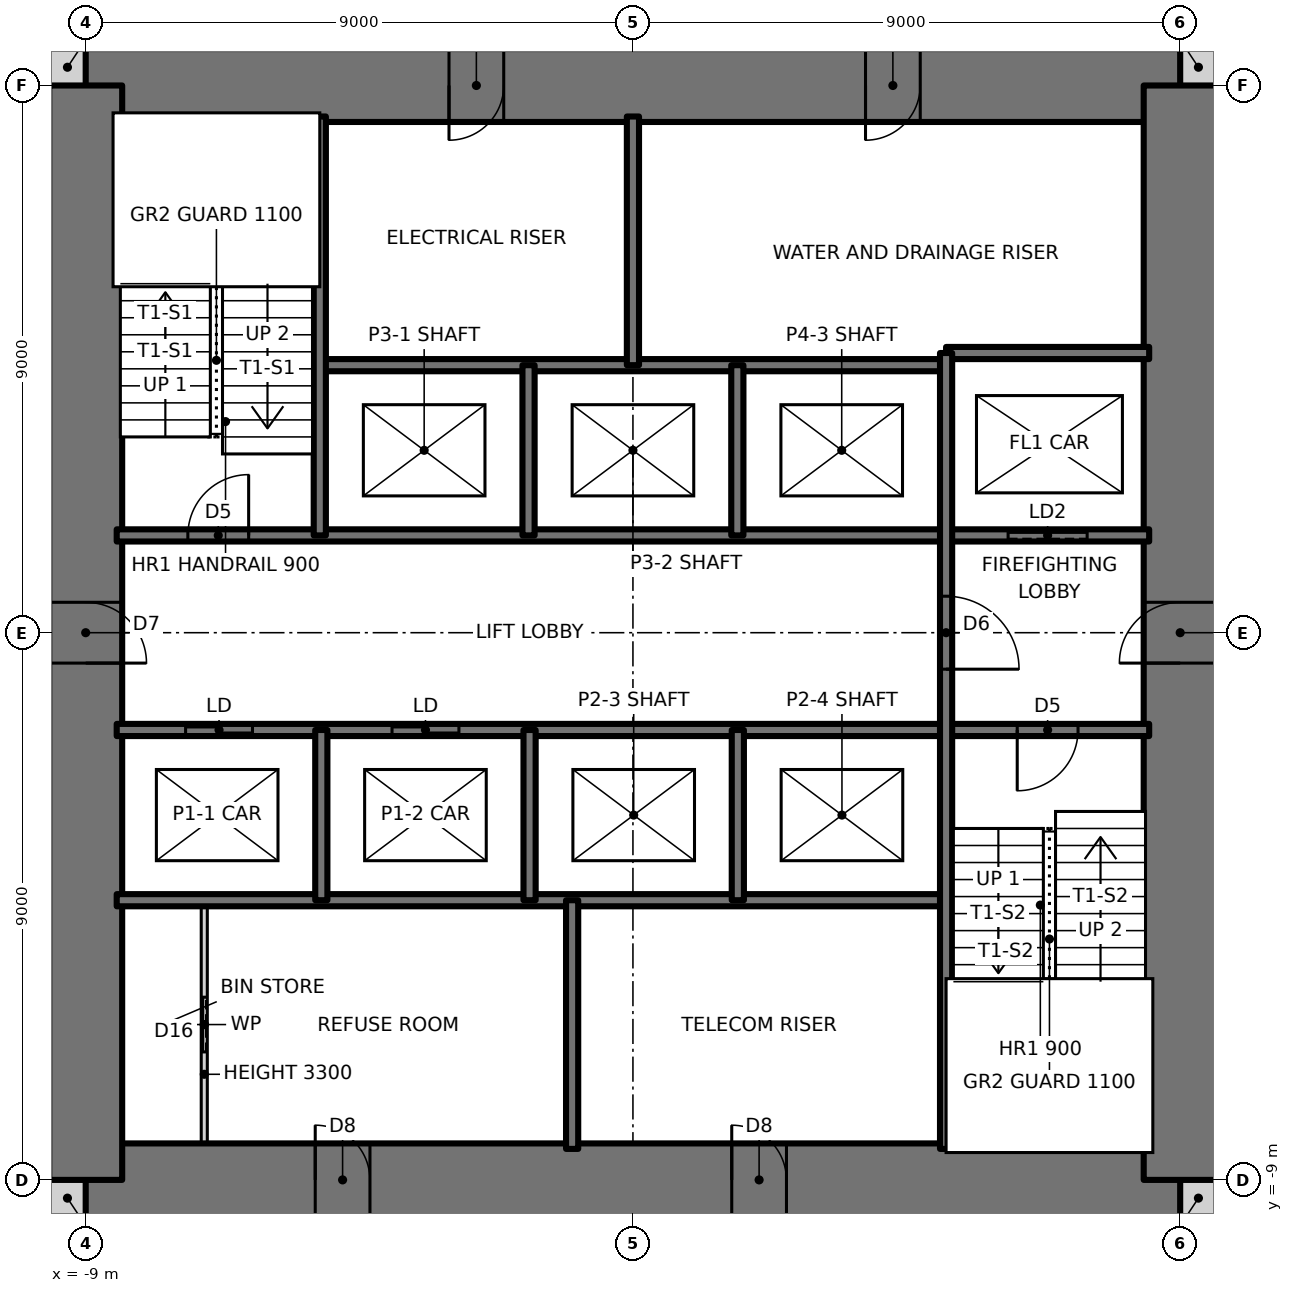
"""IFC4 building model, lengths in metres.
Left out: names, types, materials, properties, quantities, classifications, styles, units other than length and angle.
Written with IfcOpenShell. Run it as: python <this file> out.ifc"""

import sys

from ifc_helpers import new_model, si_unit, direction, frame, frame_2d, origin, place, context, subcontext, project, spatial, rectangle, extrude, element, fill, save


model = new_model("IFC4")
c1 = context("Model", 3, precision=1e-05, world=origin(), true_north=direction((0.0, 1.0)))
c2 = subcontext(c1, "Body", "Model", "MODEL_VIEW")
j1 = project(units=[si_unit("LENGTHUNIT", "METRE"), si_unit("PLANEANGLEUNIT", "RADIAN")], contexts=[c1])
p1 = place(None, origin())
s1 = spatial("IfcSite", under=j1, at=p1, CompositionType="ELEMENT")
p2 = place(p1, origin())
s2 = spatial("IfcBuilding", under=s1, at=p2, CompositionType="ELEMENT")
p3 = place(p2, frame((0.0, 0.0, 64.0)))
s3 = spatial("IfcBuildingStorey", under=s2, at=p3, CompositionType="ELEMENT", Elevation=64.0)
for number, where, z_axis, x_axis in (
    (1, (-9.6, -9.3, 0.0), (0.0, 0.0, 1.0), (1.0, 0.0, 0.0)),
    (2, (9.0, -9.3, 0.0), (0.0, 0.0, 1.0), (1.0, 0.0, 0.0)),
    (3, (9.0, 9.3, 0.0), (0.0, 0.0, 1.0), (1.0, 0.0, 0.0)),
    (4, (-9.6, 9.3, 0.0), (0.0, 0.0, 1.0), (1.0, 0.0, 0.0)),
):
    element("IfcWall", number, at=place(p3, frame(where, z_axis=z_axis, x_axis=x_axis)), inside=s3, PredefinedType="SOLIDWALL", context=c2, shape_type="SweptSolid", body=[
        extrude(rectangle(XDim=0.6, YDim=0.6, at=frame_2d((0.3, 0.0))), origin(), (0.0, 0.0, 1.0), 3.5),
    ])
p4 = place(p3, frame((-9.0, -9.0, 0.0), z_axis=(0.0, 0.0, 1.0), x_axis=(1.0, 0.0, 0.0)))
e5 = element("IfcWall", 5, at=p4, inside=s3, PredefinedType="SHEAR", context=c2, shape_type="SweptSolid", body=[
    extrude(rectangle(XDim=18.0, YDim=1.2, at=frame_2d((9.0, 0.0))), origin(), (0.0, 0.0, 1.0), 3.5),
])
p5 = place(p4, frame((3.775, 0.0, 0.0)))
e6 = element("IfcOpeningElement", 6, at=p5, cuts=e5, PredefinedType="OPENING", context=c2, shape_type="SweptSolid", body=[
    extrude(rectangle(XDim=0.9, YDim=2.1, at=frame_2d((0.45, 1.05))), frame((0.0, 0.61, 0.0), z_axis=(0.0, -1.0, 0.0), x_axis=(1.0, 0.0, 0.0)), (0.0, 0.0, 1.0), 1.22),
])
p6 = place(p4, frame((10.625, 0.0, 0.0)))
e7 = element("IfcOpeningElement", 7, at=p6, cuts=e5, PredefinedType="OPENING", context=c2, shape_type="SweptSolid", body=[
    extrude(rectangle(XDim=0.9, YDim=2.1, at=frame_2d((0.45, 1.05))), frame((0.0, 0.61, 0.0), z_axis=(0.0, -1.0, 0.0), x_axis=(1.0, 0.0, 0.0)), (0.0, 0.0, 1.0), 1.22),
])
p7 = place(p3, frame((9.0, 9.0, 0.0), z_axis=(0.0, 0.0, 1.0), x_axis=(-1.0, 0.0, 0.0)))
e8 = element("IfcWall", 8, at=p7, inside=s3, PredefinedType="SHEAR", context=c2, shape_type="SweptSolid", body=[
    extrude(rectangle(XDim=18.0, YDim=1.2, at=frame_2d((9.0, 0.0))), origin(), (0.0, 0.0, 1.0), 3.5),
])
p8 = place(p7, frame((11.125, 0.0, 0.0)))
e9 = element("IfcOpeningElement", 9, at=p8, cuts=e8, PredefinedType="OPENING", context=c2, shape_type="SweptSolid", body=[
    extrude(rectangle(XDim=0.9, YDim=2.1, at=frame_2d((0.45, 1.05))), frame((0.0, 0.61, 0.0), z_axis=(0.0, -1.0, 0.0), x_axis=(1.0, 0.0, 0.0)), (0.0, 0.0, 1.0), 1.22),
])
p9 = place(p7, frame((4.275, 0.0, 0.0)))
e10 = element("IfcOpeningElement", 10, at=p9, cuts=e8, PredefinedType="OPENING", context=c2, shape_type="SweptSolid", body=[
    extrude(rectangle(XDim=0.9, YDim=2.1, at=frame_2d((0.45, 1.05))), frame((0.0, 0.61, 0.0), z_axis=(0.0, -1.0, 0.0), x_axis=(1.0, 0.0, 0.0)), (0.0, 0.0, 1.0), 1.22),
])
p10 = place(p3, frame((9.0, -9.0, 0.0), z_axis=(0.0, 0.0, 1.0), x_axis=(0.0, 1.0, 0.0)))
e11 = element("IfcWall", 11, at=p10, inside=s3, PredefinedType="SHEAR", context=c2, shape_type="SweptSolid", body=[
    extrude(rectangle(XDim=18.0, YDim=1.2, at=frame_2d((9.0, 0.0))), origin(), (0.0, 0.0, 1.0), 3.5),
])
p11 = place(p10, frame((8.5, 0.0, 0.0)))
e12 = element("IfcOpeningElement", 12, at=p11, cuts=e11, PredefinedType="OPENING", context=c2, shape_type="SweptSolid", body=[
    extrude(rectangle(XDim=1.0, YDim=2.1, at=frame_2d((0.5, 1.05))), frame((0.0, 0.61, 0.0), z_axis=(0.0, -1.0, 0.0), x_axis=(1.0, 0.0, 0.0)), (0.0, 0.0, 1.0), 1.22),
])
p12 = place(p3, frame((-9.0, 9.0, 0.0), z_axis=(0.0, 0.0, 1.0), x_axis=(0.0, -1.0, 0.0)))
e13 = element("IfcWall", 13, at=p12, inside=s3, PredefinedType="SHEAR", context=c2, shape_type="SweptSolid", body=[
    extrude(rectangle(XDim=18.0, YDim=1.2, at=frame_2d((9.0, 0.0))), origin(), (0.0, 0.0, 1.0), 3.5),
])
p13 = place(p12, frame((8.5, 0.0, 0.0)))
e14 = element("IfcOpeningElement", 14, at=p13, cuts=e13, PredefinedType="OPENING", context=c2, shape_type="SweptSolid", body=[
    extrude(rectangle(XDim=1.0, YDim=2.1, at=frame_2d((0.5, 1.05))), frame((0.0, 0.61, 0.0), z_axis=(0.0, -1.0, 0.0), x_axis=(1.0, 0.0, 0.0)), (0.0, 0.0, 1.0), 1.22),
])
p14 = place(p3, frame((-8.49, -4.4, 0.0), z_axis=(0.0, 0.0, 1.0), x_axis=(1.0, 0.0, 0.0)))
e15 = element("IfcWall", 15, at=p14, inside=s3, PredefinedType="SOLIDWALL", context=c2, shape_type="SweptSolid", body=[
    extrude(rectangle(XDim=13.64, YDim=0.2, at=frame_2d((6.82, 0.0))), origin(), (0.0, 0.0, 1.0), 3.5),
])
p15 = place(p3, frame((-8.49, -1.6, 0.0), z_axis=(0.0, 0.0, 1.0), x_axis=(1.0, 0.0, 0.0)))
e16 = element("IfcWall", 16, at=p15, inside=s3, PredefinedType="SOLIDWALL", context=c2, shape_type="SweptSolid", body=[
    extrude(rectangle(XDim=16.98, YDim=0.2, at=frame_2d((8.49, 0.0))), origin(), (0.0, 0.0, 1.0), 3.5),
])
p16 = place(p15, frame((14.81, 0.0, 0.0)))
e17 = element("IfcOpeningElement", 17, at=p16, cuts=e16, PredefinedType="OPENING", context=c2, shape_type="SweptSolid", body=[
    extrude(rectangle(XDim=1.0, YDim=2.1, at=frame_2d((0.5, 1.05))), frame((0.0, 0.11, 0.0), z_axis=(0.0, -1.0, 0.0), x_axis=(1.0, 0.0, 0.0)), (0.0, 0.0, 1.0), 0.22),
])
p17 = place(p15, frame((1.133, 0.0, 0.0)))
e18 = element("IfcOpeningElement", 18, at=p17, cuts=e16, PredefinedType="OPENING", context=c2, shape_type="SweptSolid", body=[
    extrude(rectangle(XDim=1.1, YDim=2.1, at=frame_2d((0.55, 1.05))), frame((0.0, 0.11, 0.0), z_axis=(0.0, -1.0, 0.0), x_axis=(1.0, 0.0, 0.0)), (0.0, 0.0, 1.0), 0.22),
])
p18 = place(p15, frame((4.528, 0.0, 0.0)))
e19 = element("IfcOpeningElement", 19, at=p18, cuts=e16, PredefinedType="OPENING", context=c2, shape_type="SweptSolid", body=[
    extrude(rectangle(XDim=1.1, YDim=2.1, at=frame_2d((0.55, 1.05))), frame((0.0, 0.11, 0.0), z_axis=(0.0, -1.0, 0.0), x_axis=(1.0, 0.0, 0.0)), (0.0, 0.0, 1.0), 0.22),
])
p19 = place(p3, frame((-8.49, 1.6, 0.0), z_axis=(0.0, 0.0, 1.0), x_axis=(1.0, 0.0, 0.0)))
e20 = element("IfcWall", 20, at=p19, inside=s3, PredefinedType="SOLIDWALL", context=c2, shape_type="SweptSolid", body=[
    extrude(rectangle(XDim=16.98, YDim=0.2, at=frame_2d((8.49, 0.0))), origin(), (0.0, 0.0, 1.0), 3.5),
])
p20 = place(p19, frame((1.17, 0.0, 0.0)))
e21 = element("IfcOpeningElement", 21, at=p20, cuts=e20, PredefinedType="OPENING", context=c2, shape_type="SweptSolid", body=[
    extrude(rectangle(XDim=1.0, YDim=2.1, at=frame_2d((0.5, 1.05))), frame((0.0, 0.11, 0.0), z_axis=(0.0, -1.0, 0.0), x_axis=(1.0, 0.0, 0.0)), (0.0, 0.0, 1.0), 0.22),
])
p21 = place(p19, frame((14.66, 0.0, 0.0)))
e22 = element("IfcOpeningElement", 22, at=p21, cuts=e20, PredefinedType="OPENING", context=c2, shape_type="SweptSolid", body=[
    extrude(rectangle(XDim=1.3, YDim=2.1, at=frame_2d((0.65, 1.05))), frame((0.0, 0.11, 0.0), z_axis=(0.0, -1.0, 0.0), x_axis=(1.0, 0.0, 0.0)), (0.0, 0.0, 1.0), 0.22),
])
p22 = place(p3, frame((-5.15, 4.4, 0.0), z_axis=(0.0, 0.0, 1.0), x_axis=(1.0, 0.0, 0.0)))
e23 = element("IfcWall", 23, at=p22, inside=s3, PredefinedType="SOLIDWALL", context=c2, shape_type="SweptSolid", body=[
    extrude(rectangle(XDim=10.3, YDim=0.2, at=frame_2d((5.15, 0.0))), origin(), (0.0, 0.0, 1.0), 3.5),
])
p23 = place(p3, frame((5.15, 4.6, 0.0), z_axis=(0.0, 0.0, 1.0), x_axis=(1.0, 0.0, 0.0)))
e24 = element("IfcWall", 24, at=p23, inside=s3, PredefinedType="SOLIDWALL", context=c2, shape_type="SweptSolid", body=[
    extrude(rectangle(XDim=3.34, YDim=0.2, at=frame_2d((1.67, 0.0))), origin(), (0.0, 0.0, 1.0), 3.5),
])
p24 = place(p3, frame((5.15, -8.49, 0.0), z_axis=(0.0, 0.0, 1.0), x_axis=(0.0, 1.0, 0.0)))
e25 = element("IfcWall", 25, at=p24, inside=s3, PredefinedType="SOLIDWALL", context=c2, shape_type="SweptSolid", body=[
    extrude(rectangle(XDim=13.09, YDim=0.2, at=frame_2d((6.545, 0.0))), origin(), (0.0, 0.0, 1.0), 3.5),
])
p25 = place(p24, frame((7.89, 0.0, 0.0)))
e26 = element("IfcOpeningElement", 26, at=p25, cuts=e25, PredefinedType="OPENING", context=c2, shape_type="SweptSolid", body=[
    extrude(rectangle(XDim=1.2, YDim=2.1, at=frame_2d((0.6, 1.05))), frame((0.0, 0.11, 0.0), z_axis=(0.0, -1.0, 0.0), x_axis=(1.0, 0.0, 0.0)), (0.0, 0.0, 1.0), 0.22),
])
for number, where, z_axis, x_axis in (
    (27, (1.725, -4.4, 0.0), (0.0, 0.0, 1.0), (0.0, 1.0, 0.0)),
    (28, (1.717, 1.6, 0.0), (0.0, 0.0, 1.0), (0.0, 1.0, 0.0)),
):
    element("IfcWall", number, at=place(p3, frame(where, z_axis=z_axis, x_axis=x_axis)), inside=s3, PredefinedType="SOLIDWALL", context=c2, shape_type="SweptSolid", body=[
        extrude(rectangle(XDim=2.8, YDim=0.2, at=frame_2d((1.4, 0.0))), origin(), (0.0, 0.0, 1.0), 3.5),
    ])
for number, where, z_axis, x_axis in (
    (29, (0.0, 4.4, 0.0), (0.0, 0.0, 1.0), (0.0, 1.0, 0.0)),
    (30, (-1.0, -8.49, 0.0), (0.0, 0.0, 1.0), (0.0, 1.0, 0.0)),
):
    element("IfcWall", number, at=place(p3, frame(where, z_axis=z_axis, x_axis=x_axis)), inside=s3, PredefinedType="SOLIDWALL", context=c2, shape_type="SweptSolid", body=[
        extrude(rectangle(XDim=4.09, YDim=0.2, at=frame_2d((2.045, 0.0))), origin(), (0.0, 0.0, 1.0), 3.5),
    ])
for number, where, z_axis, x_axis in (
    (31, (-1.7, -4.4, 0.0), (0.0, 0.0, 1.0), (0.0, 1.0, 0.0)),
    (32, (-1.717, 1.6, 0.0), (0.0, 0.0, 1.0), (0.0, 1.0, 0.0)),
    (33, (-5.125, -4.4, 0.0), (0.0, 0.0, 1.0), (0.0, 1.0, 0.0)),
):
    element("IfcWall", number, at=place(p3, frame(where, z_axis=z_axis, x_axis=x_axis)), inside=s3, PredefinedType="SOLIDWALL", context=c2, shape_type="SweptSolid", body=[
        extrude(rectangle(XDim=2.8, YDim=0.2, at=frame_2d((1.4, 0.0))), origin(), (0.0, 0.0, 1.0), 3.5),
    ])
p26 = place(p3, frame((-5.15, 1.6, 0.0), z_axis=(0.0, 0.0, 1.0), x_axis=(0.0, 1.0, 0.0)))
e34 = element("IfcWall", 34, at=p26, inside=s3, PredefinedType="SOLIDWALL", context=c2, shape_type="SweptSolid", body=[
    extrude(rectangle(XDim=6.89, YDim=0.2, at=frame_2d((3.445, 0.0))), origin(), (0.0, 0.0, 1.0), 3.5),
])
p27 = place(p3, frame((-7.05, -8.49, 0.0), z_axis=(0.0, 0.0, 1.0), x_axis=(0.0, 1.0, 0.0)))
e35 = element("IfcWall", 35, at=p27, inside=s3, PredefinedType="PARTITIONING", context=c2, shape_type="SweptSolid", body=[
    extrude(rectangle(XDim=4.09, YDim=0.1, at=frame_2d((2.045, 0.0))), origin(), (0.0, 0.0, 1.0), 3.3),
])
p28 = place(p27, frame((1.595, 0.0, 0.0)))
e36 = element("IfcOpeningElement", 36, at=p28, cuts=e35, PredefinedType="OPENING", context=c2, shape_type="SweptSolid", body=[
    extrude(rectangle(XDim=0.9, YDim=2.1, at=frame_2d((0.45, 1.05))), frame((0.0, 0.06, 0.0), z_axis=(0.0, -1.0, 0.0), x_axis=(1.0, 0.0, 0.0)), (0.0, 0.0, 1.0), 0.12),
])
p29 = place(p20, origin())
e37 = element("IfcDoor", 37, at=p29, inside=s3, OperationType="SINGLE_SWING_RIGHT", PredefinedType="DOOR", context=c2, shape_type="SweptSolid", body=[
    extrude(rectangle(XDim=1.0, YDim=2.1, at=frame_2d((0.5, 1.05))), frame((0.0, 0.025, 0.0), z_axis=(0.0, -1.0, 0.0), x_axis=(1.0, 0.0, 0.0)), (0.0, 0.0, 1.0), 0.05),
])
fill(e21, e37)
p30 = place(p16, frame((1.0, 0.0, 0.0), z_axis=(0.0, 0.0, 1.0), x_axis=(-1.0, 0.0, 0.0)))
e38 = element("IfcDoor", 38, at=p30, inside=s3, OperationType="SINGLE_SWING_RIGHT", PredefinedType="DOOR", context=c2, shape_type="SweptSolid", body=[
    extrude(rectangle(XDim=1.0, YDim=2.1, at=frame_2d((0.5, 1.05))), frame((0.0, 0.025, 0.0), z_axis=(0.0, -1.0, 0.0), x_axis=(1.0, 0.0, 0.0)), (0.0, 0.0, 1.0), 0.05),
])
fill(e17, e38)
p31 = place(p25, frame((1.2, 0.0, 0.0), z_axis=(0.0, 0.0, 1.0), x_axis=(-1.0, 0.0, 0.0)))
e39 = element("IfcDoor", 39, at=p31, inside=s3, OperationType="SINGLE_SWING_RIGHT", PredefinedType="DOOR", context=c2, shape_type="SweptSolid", body=[
    extrude(rectangle(XDim=1.2, YDim=2.1, at=frame_2d((0.6, 1.05))), frame((0.0, 0.025, 0.0), z_axis=(0.0, -1.0, 0.0), x_axis=(1.0, 0.0, 0.0)), (0.0, 0.0, 1.0), 0.05),
])
fill(e26, e39)
p32 = place(p28, origin())
e40 = element("IfcDoor", 40, at=p32, inside=s3, OperationType="SLIDING_TO_LEFT", PredefinedType="DOOR", context=c2, shape_type="SweptSolid", body=[
    extrude(rectangle(XDim=0.9, YDim=2.1, at=frame_2d((0.45, 1.05))), frame((0.0, 0.025, 0.0), z_axis=(0.0, -1.0, 0.0), x_axis=(1.0, 0.0, 0.0)), (0.0, 0.0, 1.0), 0.05),
])
fill(e36, e40)
p33 = place(p13, origin())
e41 = element("IfcDoor", 41, at=p33, inside=s3, OperationType="SINGLE_SWING_RIGHT", PredefinedType="DOOR", context=c2, shape_type="SweptSolid", body=[
    extrude(rectangle(XDim=1.0, YDim=2.1, at=frame_2d((0.5, 1.05))), frame((0.0, 0.025, 0.0), z_axis=(0.0, -1.0, 0.0), x_axis=(1.0, 0.0, 0.0)), (0.0, 0.0, 1.0), 0.05),
])
fill(e14, e41)
p34 = place(p11, origin())
e42 = element("IfcDoor", 42, at=p34, inside=s3, OperationType="SINGLE_SWING_LEFT", PredefinedType="DOOR", context=c2, shape_type="SweptSolid", body=[
    extrude(rectangle(XDim=1.0, YDim=2.1, at=frame_2d((0.5, 1.05))), frame((0.0, 0.025, 0.0), z_axis=(0.0, -1.0, 0.0), x_axis=(1.0, 0.0, 0.0)), (0.0, 0.0, 1.0), 0.05),
])
fill(e12, e42)
p35 = place(p8, origin())
e43 = element("IfcDoor", 43, at=p35, inside=s3, OperationType="SINGLE_SWING_RIGHT", PredefinedType="DOOR", context=c2, shape_type="SweptSolid", body=[
    extrude(rectangle(XDim=0.9, YDim=2.1, at=frame_2d((0.45, 1.05))), frame((0.0, 0.025, 0.0), z_axis=(0.0, -1.0, 0.0), x_axis=(1.0, 0.0, 0.0)), (0.0, 0.0, 1.0), 0.05),
])
fill(e9, e43)
p36 = place(p9, origin())
e44 = element("IfcDoor", 44, at=p36, inside=s3, OperationType="SINGLE_SWING_RIGHT", PredefinedType="DOOR", context=c2, shape_type="SweptSolid", body=[
    extrude(rectangle(XDim=0.9, YDim=2.1, at=frame_2d((0.45, 1.05))), frame((0.0, 0.025, 0.0), z_axis=(0.0, -1.0, 0.0), x_axis=(1.0, 0.0, 0.0)), (0.0, 0.0, 1.0), 0.05),
])
fill(e10, e44)
p37 = place(p5, origin())
e45 = element("IfcDoor", 45, at=p37, inside=s3, OperationType="SINGLE_SWING_LEFT", PredefinedType="DOOR", context=c2, shape_type="SweptSolid", body=[
    extrude(rectangle(XDim=0.9, YDim=2.1, at=frame_2d((0.45, 1.05))), frame((0.0, 0.025, 0.0), z_axis=(0.0, -1.0, 0.0), x_axis=(1.0, 0.0, 0.0)), (0.0, 0.0, 1.0), 0.05),
])
fill(e6, e45)
p38 = place(p6, origin())
e46 = element("IfcDoor", 46, at=p38, inside=s3, OperationType="SINGLE_SWING_LEFT", PredefinedType="DOOR", context=c2, shape_type="SweptSolid", body=[
    extrude(rectangle(XDim=0.9, YDim=2.1, at=frame_2d((0.45, 1.05))), frame((0.0, 0.025, 0.0), z_axis=(0.0, -1.0, 0.0), x_axis=(1.0, 0.0, 0.0)), (0.0, 0.0, 1.0), 0.05),
])
fill(e7, e46)
p39 = place(p17, origin())
e47 = element("IfcDoor", 47, at=p39, inside=s3, OperationType="DOUBLE_DOOR_SLIDING", PredefinedType="DOOR", context=c2, shape_type="SweptSolid", body=[
    extrude(rectangle(XDim=1.1, YDim=2.1, at=frame_2d((0.55, 1.05))), frame((0.0, 0.025, 0.0), z_axis=(0.0, -1.0, 0.0), x_axis=(1.0, 0.0, 0.0)), (0.0, 0.0, 1.0), 0.05),
])
fill(e18, e47)
p40 = place(p18, origin())
e48 = element("IfcDoor", 48, at=p40, inside=s3, OperationType="DOUBLE_DOOR_SLIDING", PredefinedType="DOOR", context=c2, shape_type="SweptSolid", body=[
    extrude(rectangle(XDim=1.1, YDim=2.1, at=frame_2d((0.55, 1.05))), frame((0.0, 0.025, 0.0), z_axis=(0.0, -1.0, 0.0), x_axis=(1.0, 0.0, 0.0)), (0.0, 0.0, 1.0), 0.05),
])
fill(e19, e48)
p41 = place(p21, origin())
e49 = element("IfcDoor", 49, at=p41, inside=s3, OperationType="SLIDING_TO_LEFT", PredefinedType="DOOR", context=c2, shape_type="SweptSolid", body=[
    extrude(rectangle(XDim=1.3, YDim=2.1, at=frame_2d((0.65, 1.05))), frame((0.0, 0.025, 0.0), z_axis=(0.0, -1.0, 0.0), x_axis=(1.0, 0.0, 0.0)), (0.0, 0.0, 1.0), 0.05),
])
fill(e22, e49)
save(model, sys.argv[1])
